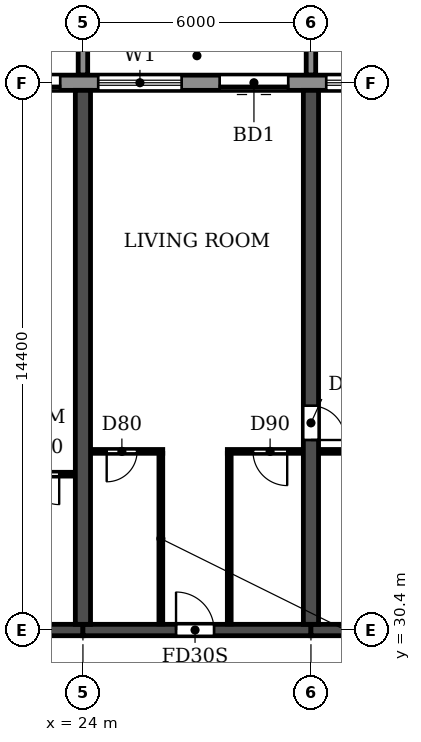
"""IFC4 building model, lengths in metres.
Left out: names, types, materials, properties, quantities, classifications, styles, units other than length and angle.
Written with IfcOpenShell. Run it as: python <this file> out.ifc"""

import sys

from ifc_helpers import new_model, si_unit, direction, frame, frame_2d, origin, place, context, subcontext, project, spatial, polyline, rectangle, outline, extrude, source, transform, mapped, element, fill, save


model = new_model("IFC4")
c1 = context("Model", 3, precision=1e-05, world=origin(), true_north=direction((0.0, 1.0)))
c2 = subcontext(c1, "Body", "Model", "MODEL_VIEW")
j1 = project(units=[si_unit("LENGTHUNIT", "METRE"), si_unit("PLANEANGLEUNIT", "RADIAN")], contexts=[c1])
p1 = place(None, origin())
s1 = spatial("IfcSite", under=j1, at=p1, CompositionType="ELEMENT")
p2 = place(p1, origin())
s2 = spatial("IfcBuilding", under=s1, at=p2, CompositionType="ELEMENT")
p3 = place(p2, frame((0.0, 0.0, 63.0)))
s3 = spatial("IfcBuildingStorey", under=s2, at=p3, CompositionType="ELEMENT", Elevation=63.0)
p4 = place(p3, frame((24.0, 30.55, 0.0), z_axis=(0.0, 0.0, 1.0), x_axis=(0.0, 1.0, 0.0)))
e1 = element("IfcWall", 1, at=p4, inside=s3, PredefinedType="SHEAR", context=c2, shape_type="SweptSolid", body=[
    extrude(rectangle(XDim=14.05, YDim=0.4, at=frame_2d((7.025, 0.0))), origin(), (0.0, 0.0, 1.0), 2.95),
])
p5 = place(p3, frame((30.0, 30.55, 0.0), z_axis=(0.0, 0.0, 1.0), x_axis=(0.0, 1.0, 0.0)))
e2 = element("IfcWall", 2, at=p5, inside=s3, PredefinedType="SHEAR", context=c2, shape_type="SweptSolid", body=[
    extrude(rectangle(XDim=14.05, YDim=0.4, at=frame_2d((7.025, 0.0))), origin(), (0.0, 0.0, 1.0), 2.95),
])
p6 = place(p5, frame((4.85, 0.0, 0.0)))
e3 = element("IfcOpeningElement", 3, at=p6, cuts=e2, PredefinedType="OPENING", context=c2, shape_type="SweptSolid", body=[
    extrude(rectangle(XDim=0.9, YDim=2.1, at=frame_2d((0.45, 1.05))), frame((0.0, 0.21, 0.0), z_axis=(0.0, -1.0, 0.0), x_axis=(1.0, 0.0, 0.0)), (0.0, 0.0, 1.0), 0.42),
])
p7 = place(p3, frame((18.0, 30.4, 0.0), z_axis=(0.0, 0.0, 1.0), x_axis=(1.0, 0.0, 0.0)))
e4 = element("IfcWall", 4, at=p7, inside=s3, PredefinedType="SHEAR", context=c2, shape_type="SweptSolid", body=[
    extrude(rectangle(XDim=6.0, YDim=0.3, at=frame_2d((3.0, 0.0))), origin(), (0.0, 0.0, 1.0), 2.35),
])
p8 = place(p7, frame((2.55, 0.0, 0.0)))
e5 = element("IfcOpeningElement", 5, at=p8, cuts=e4, PredefinedType="OPENING", context=c2, shape_type="SweptSolid", body=[
    extrude(rectangle(XDim=1.0, YDim=2.1, at=frame_2d((0.5, 1.05))), frame((0.0, 0.16, 0.0), z_axis=(0.0, -1.0, 0.0), x_axis=(1.0, 0.0, 0.0)), (0.0, 0.0, 1.0), 0.32),
])
p9 = place(p3, frame((24.0, 30.4, 0.0), z_axis=(0.0, 0.0, 1.0), x_axis=(1.0, 0.0, 0.0)))
e6 = element("IfcWall", 6, at=p9, inside=s3, PredefinedType="SHEAR", context=c2, shape_type="SweptSolid", body=[
    extrude(rectangle(XDim=6.0, YDim=0.3, at=frame_2d((3.0, 0.0))), origin(), (0.0, 0.0, 1.0), 2.35),
])
p10 = place(p9, frame((2.45, 0.0, 0.0)))
e7 = element("IfcOpeningElement", 7, at=p10, cuts=e6, PredefinedType="OPENING", context=c2, shape_type="SweptSolid", body=[
    extrude(rectangle(XDim=1.0, YDim=2.1, at=frame_2d((0.5, 1.05))), frame((0.0, 0.16, 0.0), z_axis=(0.0, -1.0, 0.0), x_axis=(1.0, 0.0, 0.0)), (0.0, 0.0, 1.0), 0.32),
])
p11 = place(p3, frame((30.0, 30.4, 0.0), z_axis=(0.0, 0.0, 1.0), x_axis=(1.0, 0.0, 0.0)))
e8 = element("IfcWall", 8, at=p11, inside=s3, PredefinedType="SHEAR", context=c2, shape_type="SweptSolid", body=[
    extrude(rectangle(XDim=6.0, YDim=0.3, at=frame_2d((3.0, 0.0))), origin(), (0.0, 0.0, 1.0), 2.35),
])
p12 = place(p3, frame((91.317, 44.8, 0.0), z_axis=(0.0, 0.0, 1.0), x_axis=(-1.0, 0.0, 0.0)))
e9 = element("IfcWall", 9, at=p12, inside=s3, PredefinedType="STANDARD", context=c2, shape_type="SweptSolid", body=[
    extrude(rectangle(XDim=80.634, YDim=0.4, at=frame_2d((40.317, 0.0))), origin(), (0.0, 0.0, 1.0), 2.95),
])
p13 = place(p12, frame((76.717, 0.0, 0.9)))
e10 = element("IfcOpeningElement", 10, at=p13, cuts=e9, PredefinedType="OPENING", context=c2, shape_type="SweptSolid", body=[
    extrude(rectangle(XDim=2.2, YDim=1.5, at=frame_2d((1.1, 0.75))), frame((0.0, 0.21, 0.0), z_axis=(0.0, -1.0, 0.0), x_axis=(1.0, 0.0, 0.0)), (0.0, 0.0, 1.0), 0.42),
])
p14 = place(p12, frame((73.917, 0.0, 0.0)))
e11 = element("IfcOpeningElement", 11, at=p14, cuts=e9, PredefinedType="OPENING", context=c2, shape_type="SweptSolid", body=[
    extrude(rectangle(XDim=1.8, YDim=2.4, at=frame_2d((0.9, 1.2))), frame((0.0, 0.21, 0.0), z_axis=(0.0, -1.0, 0.0), x_axis=(1.0, 0.0, 0.0)), (0.0, 0.0, 1.0), 0.42),
])
p15 = place(p12, frame((70.717, 0.0, 0.9)))
e12 = element("IfcOpeningElement", 12, at=p15, cuts=e9, PredefinedType="OPENING", context=c2, shape_type="SweptSolid", body=[
    extrude(rectangle(XDim=2.2, YDim=1.5, at=frame_2d((1.1, 0.75))), frame((0.0, 0.21, 0.0), z_axis=(0.0, -1.0, 0.0), x_axis=(1.0, 0.0, 0.0)), (0.0, 0.0, 1.0), 0.42),
])
p16 = place(p12, frame((67.917, 0.0, 0.0)))
e13 = element("IfcOpeningElement", 13, at=p16, cuts=e9, PredefinedType="OPENING", context=c2, shape_type="SweptSolid", body=[
    extrude(rectangle(XDim=1.8, YDim=2.4, at=frame_2d((0.9, 1.2))), frame((0.0, 0.21, 0.0), z_axis=(0.0, -1.0, 0.0), x_axis=(1.0, 0.0, 0.0)), (0.0, 0.0, 1.0), 0.42),
])
p17 = place(p12, frame((64.717, 0.0, 0.9)))
e14 = element("IfcOpeningElement", 14, at=p17, cuts=e9, PredefinedType="OPENING", context=c2, shape_type="SweptSolid", body=[
    extrude(rectangle(XDim=2.2, YDim=1.5, at=frame_2d((1.1, 0.75))), frame((0.0, 0.21, 0.0), z_axis=(0.0, -1.0, 0.0), x_axis=(1.0, 0.0, 0.0)), (0.0, 0.0, 1.0), 0.42),
])
p18 = place(p12, frame((61.917, 0.0, 0.0)))
e15 = element("IfcOpeningElement", 15, at=p18, cuts=e9, PredefinedType="OPENING", context=c2, shape_type="SweptSolid", body=[
    extrude(rectangle(XDim=1.8, YDim=2.4, at=frame_2d((0.9, 1.2))), frame((0.0, 0.21, 0.0), z_axis=(0.0, -1.0, 0.0), x_axis=(1.0, 0.0, 0.0)), (0.0, 0.0, 1.0), 0.42),
])
p19 = place(p12, frame((58.717, 0.0, 0.9)))
e16 = element("IfcOpeningElement", 16, at=p19, cuts=e9, PredefinedType="OPENING", context=c2, shape_type="SweptSolid", body=[
    extrude(rectangle(XDim=2.2, YDim=1.5, at=frame_2d((1.1, 0.75))), frame((0.0, 0.21, 0.0), z_axis=(0.0, -1.0, 0.0), x_axis=(1.0, 0.0, 0.0)), (0.0, 0.0, 1.0), 0.42),
])
p20 = place(p12, frame((55.717, 0.0, 0.9)))
e17 = element("IfcOpeningElement", 17, at=p20, cuts=e9, PredefinedType="OPENING", context=c2, shape_type="SweptSolid", body=[
    extrude(rectangle(XDim=2.2, YDim=1.5, at=frame_2d((1.1, 0.75))), frame((0.0, 0.21, 0.0), z_axis=(0.0, -1.0, 0.0), x_axis=(1.0, 0.0, 0.0)), (0.0, 0.0, 1.0), 0.42),
])
p21 = place(p12, frame((52.917, 0.0, 0.0)))
e18 = element("IfcOpeningElement", 18, at=p21, cuts=e9, PredefinedType="OPENING", context=c2, shape_type="SweptSolid", body=[
    extrude(rectangle(XDim=1.8, YDim=2.4, at=frame_2d((0.9, 1.2))), frame((0.0, 0.21, 0.0), z_axis=(0.0, -1.0, 0.0), x_axis=(1.0, 0.0, 0.0)), (0.0, 0.0, 1.0), 0.42),
])
p22 = place(p12, frame((49.717, 0.0, 0.9)))
e19 = element("IfcOpeningElement", 19, at=p22, cuts=e9, PredefinedType="OPENING", context=c2, shape_type="SweptSolid", body=[
    extrude(rectangle(XDim=2.2, YDim=1.5, at=frame_2d((1.1, 0.75))), frame((0.0, 0.21, 0.0), z_axis=(0.0, -1.0, 0.0), x_axis=(1.0, 0.0, 0.0)), (0.0, 0.0, 1.0), 0.42),
])
p23 = place(p12, frame((46.917, 0.0, 0.0)))
e20 = element("IfcOpeningElement", 20, at=p23, cuts=e9, PredefinedType="OPENING", context=c2, shape_type="SweptSolid", body=[
    extrude(rectangle(XDim=1.8, YDim=2.4, at=frame_2d((0.9, 1.2))), frame((0.0, 0.21, 0.0), z_axis=(0.0, -1.0, 0.0), x_axis=(1.0, 0.0, 0.0)), (0.0, 0.0, 1.0), 0.42),
])
p24 = place(p12, frame((43.717, 0.0, 0.9)))
e21 = element("IfcOpeningElement", 21, at=p24, cuts=e9, PredefinedType="OPENING", context=c2, shape_type="SweptSolid", body=[
    extrude(rectangle(XDim=2.2, YDim=1.5, at=frame_2d((1.1, 0.75))), frame((0.0, 0.21, 0.0), z_axis=(0.0, -1.0, 0.0), x_axis=(1.0, 0.0, 0.0)), (0.0, 0.0, 1.0), 0.42),
])
p25 = place(p12, frame((40.717, 0.0, 0.9)))
e22 = element("IfcOpeningElement", 22, at=p25, cuts=e9, PredefinedType="OPENING", context=c2, shape_type="SweptSolid", body=[
    extrude(rectangle(XDim=2.2, YDim=1.5, at=frame_2d((1.1, 0.75))), frame((0.0, 0.21, 0.0), z_axis=(0.0, -1.0, 0.0), x_axis=(1.0, 0.0, 0.0)), (0.0, 0.0, 1.0), 0.42),
])
p26 = place(p12, frame((37.717, 0.0, 0.9)))
e23 = element("IfcOpeningElement", 23, at=p26, cuts=e9, PredefinedType="OPENING", context=c2, shape_type="SweptSolid", body=[
    extrude(rectangle(XDim=2.2, YDim=1.5, at=frame_2d((1.1, 0.75))), frame((0.0, 0.21, 0.0), z_axis=(0.0, -1.0, 0.0), x_axis=(1.0, 0.0, 0.0)), (0.0, 0.0, 1.0), 0.42),
])
p27 = place(p12, frame((34.717, 0.0, 0.9)))
e24 = element("IfcOpeningElement", 24, at=p27, cuts=e9, PredefinedType="OPENING", context=c2, shape_type="SweptSolid", body=[
    extrude(rectangle(XDim=2.2, YDim=1.5, at=frame_2d((1.1, 0.75))), frame((0.0, 0.21, 0.0), z_axis=(0.0, -1.0, 0.0), x_axis=(1.0, 0.0, 0.0)), (0.0, 0.0, 1.0), 0.42),
])
p28 = place(p12, frame((31.917, 0.0, 0.0)))
e25 = element("IfcOpeningElement", 25, at=p28, cuts=e9, PredefinedType="OPENING", context=c2, shape_type="SweptSolid", body=[
    extrude(rectangle(XDim=1.8, YDim=2.4, at=frame_2d((0.9, 1.2))), frame((0.0, 0.21, 0.0), z_axis=(0.0, -1.0, 0.0), x_axis=(1.0, 0.0, 0.0)), (0.0, 0.0, 1.0), 0.42),
])
p29 = place(p12, frame((28.917, 0.0, 0.0)))
e26 = element("IfcOpeningElement", 26, at=p29, cuts=e9, PredefinedType="OPENING", context=c2, shape_type="SweptSolid", body=[
    extrude(rectangle(XDim=1.8, YDim=2.4, at=frame_2d((0.9, 1.2))), frame((0.0, 0.21, 0.0), z_axis=(0.0, -1.0, 0.0), x_axis=(1.0, 0.0, 0.0)), (0.0, 0.0, 1.0), 0.42),
])
p30 = place(p12, frame((25.717, 0.0, 0.9)))
e27 = element("IfcOpeningElement", 27, at=p30, cuts=e9, PredefinedType="OPENING", context=c2, shape_type="SweptSolid", body=[
    extrude(rectangle(XDim=2.2, YDim=1.5, at=frame_2d((1.1, 0.75))), frame((0.0, 0.21, 0.0), z_axis=(0.0, -1.0, 0.0), x_axis=(1.0, 0.0, 0.0)), (0.0, 0.0, 1.0), 0.42),
])
p31 = place(p12, frame((22.917, 0.0, 0.0)))
e28 = element("IfcOpeningElement", 28, at=p31, cuts=e9, PredefinedType="OPENING", context=c2, shape_type="SweptSolid", body=[
    extrude(rectangle(XDim=1.8, YDim=2.4, at=frame_2d((0.9, 1.2))), frame((0.0, 0.21, 0.0), z_axis=(0.0, -1.0, 0.0), x_axis=(1.0, 0.0, 0.0)), (0.0, 0.0, 1.0), 0.42),
])
p32 = place(p12, frame((19.717, 0.0, 0.9)))
e29 = element("IfcOpeningElement", 29, at=p32, cuts=e9, PredefinedType="OPENING", context=c2, shape_type="SweptSolid", body=[
    extrude(rectangle(XDim=2.2, YDim=1.5, at=frame_2d((1.1, 0.75))), frame((0.0, 0.21, 0.0), z_axis=(0.0, -1.0, 0.0), x_axis=(1.0, 0.0, 0.0)), (0.0, 0.0, 1.0), 0.42),
])
p33 = place(p12, frame((16.917, 0.0, 0.0)))
e30 = element("IfcOpeningElement", 30, at=p33, cuts=e9, PredefinedType="OPENING", context=c2, shape_type="SweptSolid", body=[
    extrude(rectangle(XDim=1.8, YDim=2.4, at=frame_2d((0.9, 1.2))), frame((0.0, 0.21, 0.0), z_axis=(0.0, -1.0, 0.0), x_axis=(1.0, 0.0, 0.0)), (0.0, 0.0, 1.0), 0.42),
])
p34 = place(p12, frame((13.717, 0.0, 0.9)))
e31 = element("IfcOpeningElement", 31, at=p34, cuts=e9, PredefinedType="OPENING", context=c2, shape_type="SweptSolid", body=[
    extrude(rectangle(XDim=2.2, YDim=1.5, at=frame_2d((1.1, 0.75))), frame((0.0, 0.21, 0.0), z_axis=(0.0, -1.0, 0.0), x_axis=(1.0, 0.0, 0.0)), (0.0, 0.0, 1.0), 0.42),
])
p35 = place(p12, frame((10.917, 0.0, 0.0)))
e32 = element("IfcOpeningElement", 32, at=p35, cuts=e9, PredefinedType="OPENING", context=c2, shape_type="SweptSolid", body=[
    extrude(rectangle(XDim=1.8, YDim=2.4, at=frame_2d((0.9, 1.2))), frame((0.0, 0.21, 0.0), z_axis=(0.0, -1.0, 0.0), x_axis=(1.0, 0.0, 0.0)), (0.0, 0.0, 1.0), 0.42),
])
p36 = place(p12, frame((7.717, 0.0, 0.9)))
e33 = element("IfcOpeningElement", 33, at=p36, cuts=e9, PredefinedType="OPENING", context=c2, shape_type="SweptSolid", body=[
    extrude(rectangle(XDim=2.2, YDim=1.5, at=frame_2d((1.1, 0.75))), frame((0.0, 0.21, 0.0), z_axis=(0.0, -1.0, 0.0), x_axis=(1.0, 0.0, 0.0)), (0.0, 0.0, 1.0), 0.42),
])
p37 = place(p12, frame((4.717, 0.0, 0.9)))
e34 = element("IfcOpeningElement", 34, at=p37, cuts=e9, PredefinedType="OPENING", context=c2, shape_type="SweptSolid", body=[
    extrude(rectangle(XDim=2.2, YDim=1.5, at=frame_2d((1.1, 0.75))), frame((0.0, 0.21, 0.0), z_axis=(0.0, -1.0, 0.0), x_axis=(1.0, 0.0, 0.0)), (0.0, 0.0, 1.0), 0.42),
])
p38 = place(p12, frame((1.717, 0.0, 0.9)))
e35 = element("IfcOpeningElement", 35, at=p38, cuts=e9, PredefinedType="OPENING", context=c2, shape_type="SweptSolid", body=[
    extrude(rectangle(XDim=2.2, YDim=1.5, at=frame_2d((1.1, 0.75))), frame((0.0, 0.21, 0.0), z_axis=(0.0, -1.0, 0.0), x_axis=(1.0, 0.0, 0.0)), (0.0, 0.0, 1.0), 0.42),
])
m1 = source(origin(), c2, "Body", "SweptSolid", [
    extrude(outline(polyline([(0.0, 0.0), (0.25, 0.0), (0.25, 3.1), (0.0, 3.1), (0.0, 0.0)])), origin(), (0.0, 0.0, 1.0), 3.1),
])
for number, where in (
    (36, (23.875, 45.0, 0.0)),
    (37, (29.875, 45.0, 0.0)),
):
    element("IfcWall", number, at=place(p3, frame(where)), inside=s3, PredefinedType="STANDARD", context=c2, shape_type="MappedRepresentation", body=[
        mapped(m1, transform((0.0, 0.0, 0.0))),
    ])
p39 = place(p3, frame((21.9, 34.5, 0.0), z_axis=(0.0, 0.0, 1.0), x_axis=(1.0, 0.0, 0.0)))
e38 = element("IfcWall", 38, at=p39, inside=s3, PredefinedType="PARTITIONING", context=c2, shape_type="SweptSolid", body=[
    extrude(rectangle(XDim=1.89, YDim=0.1, at=frame_2d((0.945, 0.0))), origin(), (0.0, 0.0, 1.0), 2.95),
])
p40 = place(p39, frame((0.675, 0.0, 0.0)))
e39 = element("IfcOpeningElement", 39, at=p40, cuts=e38, PredefinedType="OPENING", context=c2, shape_type="SweptSolid", body=[
    extrude(rectangle(XDim=0.8, YDim=2.1, at=frame_2d((0.4, 1.05))), frame((0.0, 0.06, 0.0), z_axis=(0.0, -1.0, 0.0), x_axis=(1.0, 0.0, 0.0)), (0.0, 0.0, 1.0), 0.12),
])
p41 = place(p3, frame((24.21, 35.1, 0.0), z_axis=(0.0, 0.0, 1.0), x_axis=(1.0, 0.0, 0.0)))
e40 = element("IfcWall", 40, at=p41, inside=s3, PredefinedType="PARTITIONING", context=c2, shape_type="SweptSolid", body=[
    extrude(rectangle(XDim=1.89, YDim=0.1, at=frame_2d((0.945, 0.0))), origin(), (0.0, 0.0, 1.0), 2.95),
])
p42 = place(p41, frame((0.415, 0.0, 0.0)))
e41 = element("IfcOpeningElement", 41, at=p42, cuts=e40, PredefinedType="OPENING", context=c2, shape_type="SweptSolid", body=[
    extrude(rectangle(XDim=0.8, YDim=2.1, at=frame_2d((0.4, 1.05))), frame((0.0, 0.06, 0.0), z_axis=(0.0, -1.0, 0.0), x_axis=(1.0, 0.0, 0.0)), (0.0, 0.0, 1.0), 0.12),
])
p43 = place(p3, frame((27.8, 35.1, 0.0), z_axis=(0.0, 0.0, 1.0), x_axis=(1.0, 0.0, 0.0)))
e42 = element("IfcWall", 42, at=p43, inside=s3, PredefinedType="PARTITIONING", context=c2, shape_type="SweptSolid", body=[
    extrude(rectangle(XDim=1.99, YDim=0.1, at=frame_2d((0.995, 0.0))), origin(), (0.0, 0.0, 1.0), 2.95),
])
p44 = place(p43, frame((0.675, 0.0, 0.0)))
e43 = element("IfcOpeningElement", 43, at=p44, cuts=e42, PredefinedType="OPENING", context=c2, shape_type="SweptSolid", body=[
    extrude(rectangle(XDim=0.9, YDim=2.1, at=frame_2d((0.45, 1.05))), frame((0.0, 0.06, 0.0), z_axis=(0.0, -1.0, 0.0), x_axis=(1.0, 0.0, 0.0)), (0.0, 0.0, 1.0), 0.12),
])
p45 = place(p3, frame((30.21, 35.1, 0.0), z_axis=(0.0, 0.0, 1.0), x_axis=(1.0, 0.0, 0.0)))
e44 = element("IfcWall", 44, at=p45, inside=s3, PredefinedType="PARTITIONING", context=c2, shape_type="SweptSolid", body=[
    extrude(rectangle(XDim=2.69, YDim=0.1, at=frame_2d((1.345, 0.0))), origin(), (0.0, 0.0, 1.0), 2.95),
])
p46 = place(p45, frame((0.89, 0.0, 0.0)))
e45 = element("IfcOpeningElement", 45, at=p46, cuts=e44, PredefinedType="OPENING", context=c2, shape_type="SweptSolid", body=[
    extrude(rectangle(XDim=0.8, YDim=2.1, at=frame_2d((0.4, 1.05))), frame((0.0, 0.06, 0.0), z_axis=(0.0, -1.0, 0.0), x_axis=(1.0, 0.0, 0.0)), (0.0, 0.0, 1.0), 0.12),
])
for number, where, z_axis, x_axis in (
    (46, (26.05, 30.56, 0.0), (0.0, 0.0, 1.0), (0.0, 1.0, 0.0)),
    (47, (27.85, 30.56, 0.0), (0.0, 0.0, 1.0), (0.0, 1.0, 0.0)),
):
    element("IfcWall", number, at=place(p3, frame(where, z_axis=z_axis, x_axis=x_axis)), inside=s3, PredefinedType="PARTITIONING", context=c2, shape_type="SweptSolid", body=[
        extrude(rectangle(XDim=4.49, YDim=0.1, at=frame_2d((2.245, 0.0))), origin(), (0.0, 0.0, 1.0), 2.95),
    ])
p47 = place(p16, origin())
e48 = element("IfcDoor", 48, at=p47, inside=s3, OperationType="DOUBLE_DOOR_SLIDING", PredefinedType="DOOR", context=c2, shape_type="SweptSolid", body=[
    extrude(rectangle(XDim=1.8, YDim=2.4, at=frame_2d((0.9, 1.2))), frame((0.0, 0.025, 0.0), z_axis=(0.0, -1.0, 0.0), x_axis=(1.0, 0.0, 0.0)), (0.0, 0.0, 1.0), 0.05),
])
fill(e13, e48)
p48 = place(p17, origin())
e49 = element("IfcWindow", 49, at=p48, inside=s3, PartitioningType="DOUBLE_PANEL_HORIZONTAL", PredefinedType="WINDOW", context=c2, shape_type="SweptSolid", body=[
    extrude(rectangle(XDim=2.2, YDim=1.5, at=frame_2d((1.1, 0.75))), frame((0.0, 0.03, 0.0), z_axis=(0.0, -1.0, 0.0), x_axis=(1.0, 0.0, 0.0)), (0.0, 0.0, 1.0), 0.06),
])
fill(e14, e49)
p49 = place(p18, origin())
e50 = element("IfcDoor", 50, at=p49, inside=s3, OperationType="DOUBLE_DOOR_SLIDING", PredefinedType="DOOR", context=c2, shape_type="SweptSolid", body=[
    extrude(rectangle(XDim=1.8, YDim=2.4, at=frame_2d((0.9, 1.2))), frame((0.0, 0.025, 0.0), z_axis=(0.0, -1.0, 0.0), x_axis=(1.0, 0.0, 0.0)), (0.0, 0.0, 1.0), 0.05),
])
fill(e15, e50)
p50 = place(p19, origin())
e51 = element("IfcWindow", 51, at=p50, inside=s3, PartitioningType="DOUBLE_PANEL_HORIZONTAL", PredefinedType="WINDOW", context=c2, shape_type="SweptSolid", body=[
    extrude(rectangle(XDim=2.2, YDim=1.5, at=frame_2d((1.1, 0.75))), frame((0.0, 0.03, 0.0), z_axis=(0.0, -1.0, 0.0), x_axis=(1.0, 0.0, 0.0)), (0.0, 0.0, 1.0), 0.06),
])
fill(e16, e51)
p51 = place(p40, frame((0.8, 0.0, 0.0), z_axis=(0.0, 0.0, 1.0), x_axis=(-1.0, 0.0, 0.0)))
e52 = element("IfcDoor", 52, at=p51, inside=s3, OperationType="SINGLE_SWING_LEFT", PredefinedType="DOOR", context=c2, shape_type="SweptSolid", body=[
    extrude(rectangle(XDim=0.8, YDim=2.1, at=frame_2d((0.4, 1.05))), frame((0.0, 0.025, 0.0), z_axis=(0.0, -1.0, 0.0), x_axis=(1.0, 0.0, 0.0)), (0.0, 0.0, 1.0), 0.05),
])
fill(e39, e52)
p52 = place(p42, frame((0.8, 0.0, 0.0), z_axis=(0.0, 0.0, 1.0), x_axis=(-1.0, 0.0, 0.0)))
e53 = element("IfcDoor", 53, at=p52, inside=s3, OperationType="SINGLE_SWING_RIGHT", PredefinedType="DOOR", context=c2, shape_type="SweptSolid", body=[
    extrude(rectangle(XDim=0.8, YDim=2.1, at=frame_2d((0.4, 1.05))), frame((0.0, 0.025, 0.0), z_axis=(0.0, -1.0, 0.0), x_axis=(1.0, 0.0, 0.0)), (0.0, 0.0, 1.0), 0.05),
])
fill(e41, e53)
p53 = place(p10, origin())
e54 = element("IfcDoor", 54, at=p53, inside=s3, OperationType="SINGLE_SWING_LEFT", PredefinedType="DOOR", context=c2, shape_type="SweptSolid", body=[
    extrude(rectangle(XDim=1.0, YDim=2.1, at=frame_2d((0.5, 1.05))), frame((0.0, 0.025, 0.0), z_axis=(0.0, -1.0, 0.0), x_axis=(1.0, 0.0, 0.0)), (0.0, 0.0, 1.0), 0.05),
])
fill(e7, e54)
p54 = place(p44, frame((0.9, 0.0, 0.0), z_axis=(0.0, 0.0, 1.0), x_axis=(-1.0, 0.0, 0.0)))
e55 = element("IfcDoor", 55, at=p54, inside=s3, OperationType="SINGLE_SWING_LEFT", PredefinedType="DOOR", context=c2, shape_type="SweptSolid", body=[
    extrude(rectangle(XDim=0.9, YDim=2.1, at=frame_2d((0.45, 1.05))), frame((0.0, 0.025, 0.0), z_axis=(0.0, -1.0, 0.0), x_axis=(1.0, 0.0, 0.0)), (0.0, 0.0, 1.0), 0.05),
])
fill(e43, e55)
p55 = place(p6, frame((0.9, 0.0, 0.0), z_axis=(0.0, 0.0, 1.0), x_axis=(-1.0, 0.0, 0.0)))
e56 = element("IfcDoor", 56, at=p55, inside=s3, OperationType="SINGLE_SWING_RIGHT", PredefinedType="DOOR", context=c2, shape_type="SweptSolid", body=[
    extrude(rectangle(XDim=0.9, YDim=2.1, at=frame_2d((0.45, 1.05))), frame((0.0, 0.025, 0.0), z_axis=(0.0, -1.0, 0.0), x_axis=(1.0, 0.0, 0.0)), (0.0, 0.0, 1.0), 0.05),
])
fill(e3, e56)
save(model, sys.argv[1])
